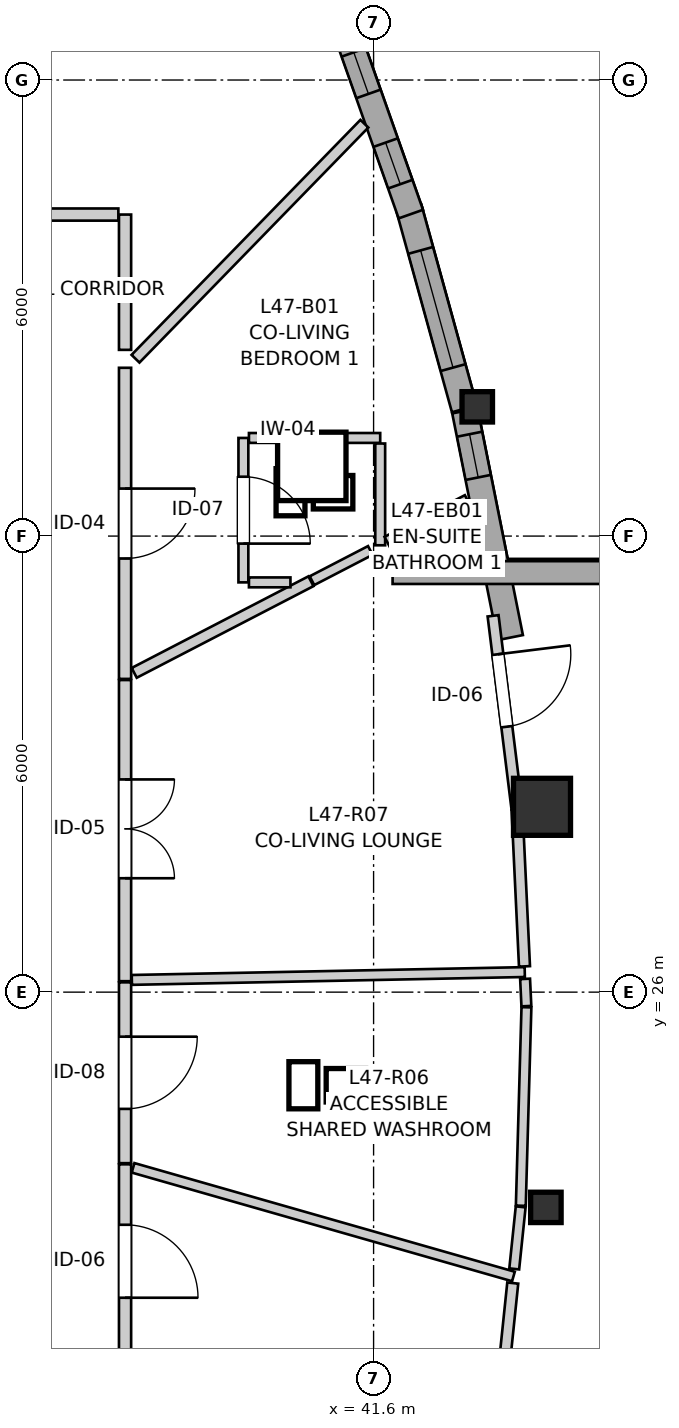
"""IFC4 building model, lengths in metres.
Left out: names, types, materials, properties, quantities, classifications, styles, units other than length and angle.
Written with IfcOpenShell. Run it as: python <this file> out.ifc"""

import sys

from ifc_helpers import new_model, si_unit, direction, frame, frame_2d, origin, origin_2d, place, context, subcontext, project, spatial, rectangle, i_section, extrude, source, transform, mapped, element, fill, save


model = new_model("IFC4")
c1 = context("Model", 3, precision=1e-05, world=origin(), true_north=direction((0.0, 1.0)))
c2 = subcontext(c1, "Body", "Model", "MODEL_VIEW")
j1 = project(units=[si_unit("LENGTHUNIT", "METRE"), si_unit("PLANEANGLEUNIT", "RADIAN")], contexts=[c1])
p1 = place(None, origin())
s1 = spatial("IfcSite", under=j1, at=p1, CompositionType="ELEMENT")
p2 = place(p1, origin())
s2 = spatial("IfcBuilding", under=s1, at=p2, CompositionType="ELEMENT")
p3 = place(p2, frame((0.0, 0.0, 158.6)))
s3 = spatial("IfcBuildingStorey", under=s2, at=p3, CompositionType="ELEMENT", Elevation=158.6)
m1 = source(origin(), c2, "Body", "SweptSolid", [
    extrude(i_section(OverallWidth=0.401, OverallDepth=0.399, WebThickness=0.023, FlangeThickness=0.036, FilletRadius=0.015, at=origin_2d()), origin(), (0.0, 0.0, 1.0), 2.95),
])
p4 = place(p3, frame((43.867, 23.168, 0.0), z_axis=(0.0, 0.0, 1.0), x_axis=(1.0, 0.0, 0.0)))
e1 = element("IfcColumn", 1, at=p4, inside=s3, PredefinedType="PILASTER", context=c2, shape_type="MappedRepresentation", body=[
    mapped(m1, transform((0.0, 0.0, 0.0), x_axis=(1.0, 0.0, 0.0), y_axis=(0.0, 1.0, 0.0), z_axis=(0.0, 0.0, 1.0), scale=1.0)),
])
m2 = source(origin(), c2, "Body", "SweptSolid", [
    extrude(rectangle(XDim=0.75, YDim=0.75, at=origin_2d()), origin(), (0.0, 0.0, 1.0), 2.95),
])
p5 = place(p3, frame((43.816, 28.438, 0.0), z_axis=(0.0, 0.0, 1.0), x_axis=(1.0, 0.0, 0.0)))
e2 = element("IfcColumn", 2, at=p5, inside=s3, PredefinedType="COLUMN", context=c2, shape_type="MappedRepresentation", body=[
    mapped(m2, transform((0.0, 0.0, 0.0), x_axis=(1.0, 0.0, 0.0), y_axis=(0.0, 1.0, 0.0), z_axis=(0.0, 0.0, 1.0), scale=1.0)),
])
p6 = place(p3, frame((42.964, 33.7, 0.0), z_axis=(0.0, 0.0, 1.0), x_axis=(1.0, 0.0, 0.0)))
e3 = element("IfcColumn", 3, at=p6, inside=s3, PredefinedType="PILASTER", context=c2, shape_type="MappedRepresentation", body=[
    mapped(m1, transform((0.0, 0.0, 0.0), x_axis=(1.0, 0.0, 0.0), y_axis=(0.0, 1.0, 0.0), z_axis=(0.0, 0.0, 1.0), scale=1.0)),
])
p7 = place(p3, frame((43.398, 30.664, 0.0), z_axis=(0.0, 0.0, 1.0), x_axis=(-0.196147002944, 0.980574501624, 0.0)))
e4 = element("IfcWall", 4, at=p7, inside=s3, PredefinedType="SOLIDWALL", context=c2, shape_type="SweptSolid", body=[
    extrude(rectangle(XDim=3.042, YDim=0.34, at=frame_2d((1.521, 0.0))), origin(), (0.0, 0.0, 1.0), 2.53),
])
p8 = place(p7, frame((2.149, 0.0, 0.82)))
e5 = element("IfcOpeningElement", 5, at=p8, cuts=e4, PredefinedType="OPENING", context=c2, shape_type="SweptSolid", body=[
    extrude(rectangle(XDim=0.58, YDim=1.35, at=frame_2d((0.29, 0.675))), frame((0.0, 0.18, 0.0), z_axis=(0.0, -1.0, 0.0), x_axis=(1.0, 0.0, 0.0)), (0.0, 0.0, 1.0), 0.36),
])
p9 = place(p3, frame((42.795, 33.674, 0.0), z_axis=(0.0, 0.0, 1.0), x_axis=(-0.266404970566, 0.963861188999, 0.0)))
e6 = element("IfcWall", 6, at=p9, inside=s3, PredefinedType="SOLIDWALL", context=c2, shape_type="SweptSolid", body=[
    extrude(rectangle(XDim=2.745, YDim=0.34, at=frame_2d((1.372, 0.0))), origin(), (0.0, 0.0, 1.0), 2.53),
])
p10 = place(p9, frame((0.562, 0.0, 0.82)))
e7 = element("IfcOpeningElement", 7, at=p10, cuts=e6, PredefinedType="OPENING", context=c2, shape_type="SweptSolid", body=[
    extrude(rectangle(XDim=1.6, YDim=1.35, at=frame_2d((0.8, 0.675))), frame((0.0, 0.18, 0.0), z_axis=(0.0, -1.0, 0.0), x_axis=(1.0, 0.0, 0.0)), (0.0, 0.0, 1.0), 0.36),
])
p11 = place(p3, frame((42.09, 36.236, 0.0), z_axis=(0.0, 0.0, 1.0), x_axis=(-0.332705243691, 0.943030869495, 0.0)))
e8 = element("IfcWall", 8, at=p11, inside=s3, PredefinedType="SOLIDWALL", context=c2, shape_type="SweptSolid", body=[
    extrude(rectangle(XDim=2.668, YDim=0.34, at=frame_2d((1.334, 0.0))), origin(), (0.0, 0.0, 1.0), 2.53),
])
p12 = place(p11, frame((0.417, 0.0, 0.82)))
e9 = element("IfcOpeningElement", 9, at=p12, cuts=e8, PredefinedType="OPENING", context=c2, shape_type="SweptSolid", body=[
    extrude(rectangle(XDim=0.58, YDim=1.35, at=frame_2d((0.29, 0.675))), frame((0.0, 0.18, 0.0), z_axis=(0.0, -1.0, 0.0), x_axis=(1.0, 0.0, 0.0)), (0.0, 0.0, 1.0), 0.36),
])
p13 = place(p11, frame((1.677, 0.0, 0.82)))
e10 = element("IfcOpeningElement", 10, at=p13, cuts=e8, PredefinedType="OPENING", context=c2, shape_type="SweptSolid", body=[
    extrude(rectangle(XDim=0.58, YDim=1.35, at=frame_2d((0.29, 0.675))), frame((0.0, 0.18, 0.0), z_axis=(0.0, -1.0, 0.0), x_axis=(1.0, 0.0, 0.0)), (0.0, 0.0, 1.0), 0.36),
])
p14 = place(p3, frame((41.85, 31.52, 0.0), z_axis=(0.0, 0.0, 1.0), x_axis=(1.0, 0.0, 0.0)))
e11 = element("IfcWall", 11, at=p14, inside=s3, PredefinedType="SOLIDWALL", context=c2, shape_type="SweptSolid", body=[
    extrude(rectangle(XDim=17.423, YDim=0.3, at=frame_2d((8.711, 0.0))), origin(), (0.0, 0.0, 1.0), 2.13),
])
p15 = place(p3, frame((38.33, 34.214, 0.0), z_axis=(0.0, 0.0, 1.0), x_axis=(0.0, -1.0, 0.0)))
e12 = element("IfcWall", 12, at=p15, inside=s3, PredefinedType="PARTITIONING", context=c2, shape_type="SweptSolid", body=[
    extrude(rectangle(XDim=4.093, YDim=0.16, at=frame_2d((2.046, 0.0))), origin(), (0.0, 0.0, 1.0), 2.95),
])
p16 = place(p15, frame((1.589, 0.0, 0.0)))
e13 = element("IfcOpeningElement", 13, at=p16, cuts=e12, PredefinedType="OPENING", context=c2, shape_type="SweptSolid", body=[
    extrude(rectangle(XDim=0.92, YDim=2.1, at=frame_2d((0.46, 1.05))), frame((0.0, 0.09, 0.0), z_axis=(0.0, -1.0, 0.0), x_axis=(1.0, 0.0, 0.0)), (0.0, 0.0, 1.0), 0.18),
])
p17 = place(p3, frame((38.33, 30.106, 0.0), z_axis=(0.0, 0.0, 1.0), x_axis=(0.0, -1.0, 0.0)))
e14 = element("IfcWall", 14, at=p17, inside=s3, PredefinedType="PARTITIONING", context=c2, shape_type="SweptSolid", body=[
    extrude(rectangle(XDim=3.962, YDim=0.16, at=frame_2d((1.981, 0.0))), origin(), (0.0, 0.0, 1.0), 2.95),
])
p18 = place(p17, frame((1.308, 0.0, 0.0)))
e15 = element("IfcOpeningElement", 15, at=p18, cuts=e14, PredefinedType="OPENING", context=c2, shape_type="SweptSolid", body=[
    extrude(rectangle(XDim=1.3, YDim=2.1, at=frame_2d((0.65, 1.05))), frame((0.0, 0.09, 0.0), z_axis=(0.0, -1.0, 0.0), x_axis=(1.0, 0.0, 0.0)), (0.0, 0.0, 1.0), 0.18),
])
p19 = place(p3, frame((43.172, 30.951, 0.0), z_axis=(0.0, 0.0, 1.0), x_axis=(0.122990311665, -0.99240787141, 0.0)))
e16 = element("IfcWall", 16, at=p19, inside=s3, PredefinedType="PARTITIONING", context=c2, shape_type="SweptSolid", body=[
    extrude(rectangle(XDim=2.561, YDim=0.145, at=frame_2d((1.28, 0.0))), origin(), (0.0, 0.0, 1.0), 2.518),
])
p20 = place(p19, frame((0.51, 0.0, 0.0)))
e17 = element("IfcOpeningElement", 17, at=p20, cuts=e16, PredefinedType="OPENING", context=c2, shape_type="SweptSolid", body=[
    extrude(rectangle(XDim=0.96, YDim=2.1, at=frame_2d((0.48, 1.05))), frame((0.0, 0.083, 0.0), z_axis=(0.0, -1.0, 0.0), x_axis=(1.0, 0.0, 0.0)), (0.0, 0.0, 1.0), 0.165),
])
p21 = place(p3, frame((38.33, 23.735, 0.0), z_axis=(0.0, 0.0, 1.0), x_axis=(0.0, -1.0, 0.0)))
e18 = element("IfcWall", 18, at=p21, inside=s3, PredefinedType="PARTITIONING", context=c2, shape_type="SweptSolid", body=[
    extrude(rectangle(XDim=2.535, YDim=0.16, at=frame_2d((1.268, 0.0))), origin(), (0.0, 0.0, 1.0), 2.95),
])
p22 = place(p21, frame((0.795, 0.0, 0.0)))
e19 = element("IfcOpeningElement", 19, at=p22, cuts=e18, PredefinedType="OPENING", context=c2, shape_type="SweptSolid", body=[
    extrude(rectangle(XDim=0.96, YDim=2.1, at=frame_2d((0.48, 1.05))), frame((0.0, 0.09, 0.0), z_axis=(0.0, -1.0, 0.0), x_axis=(1.0, 0.0, 0.0)), (0.0, 0.0, 1.0), 0.18),
])
p23 = place(p3, frame((38.33, 26.129, 0.0), z_axis=(0.0, 0.0, 1.0), x_axis=(0.0, -1.0, 0.0)))
e20 = element("IfcWall", 20, at=p23, inside=s3, PredefinedType="PARTITIONING", context=c2, shape_type="SweptSolid", body=[
    extrude(rectangle(XDim=2.379, YDim=0.16, at=frame_2d((1.189, 0.0))), origin(), (0.0, 0.0, 1.0), 2.95),
])
p24 = place(p23, frame((0.715, 0.0, 0.0)))
e21 = element("IfcOpeningElement", 21, at=p24, cuts=e20, PredefinedType="OPENING", context=c2, shape_type="SweptSolid", body=[
    extrude(rectangle(XDim=0.95, YDim=2.1, at=frame_2d((0.475, 1.05))), frame((0.0, 0.09, 0.0), z_axis=(0.0, -1.0, 0.0), x_axis=(1.0, 0.0, 0.0)), (0.0, 0.0, 1.0), 0.18),
])
p25 = place(p3, frame((39.887, 33.291, 0.0), z_axis=(0.0, 0.0, 1.0), x_axis=(0.0, -1.0, 0.0)))
e22 = element("IfcWall", 22, at=p25, inside=s3, PredefinedType="PARTITIONING", context=c2, shape_type="SweptSolid", body=[
    extrude(rectangle(XDim=1.9, YDim=0.13, at=frame_2d((0.95, 0.0))), origin(), (0.0, 0.0, 1.0), 2.95),
])
p26 = place(p25, frame((0.51, 0.0, 0.0)))
e23 = element("IfcOpeningElement", 23, at=p26, cuts=e22, PredefinedType="OPENING", context=c2, shape_type="SweptSolid", body=[
    extrude(rectangle(XDim=0.88, YDim=2.05, at=frame_2d((0.44, 1.025))), frame((0.0, 0.075, 0.0), z_axis=(0.0, -1.0, 0.0), x_axis=(1.0, 0.0, 0.0)), (0.0, 0.0, 1.0), 0.15),
])
p27 = place(p3, frame((38.436, 23.689, 0.0), z_axis=(0.0, 0.0, 1.0), x_axis=(0.961531027854, -0.274696345942, 0.0)))
e24 = element("IfcWall", 24, at=p27, inside=s3, PredefinedType="PARTITIONING", context=c2, shape_type="SweptSolid", body=[
    extrude(rectangle(XDim=5.205, YDim=0.13, at=frame_2d((2.602, 0.0))), origin(), (0.0, 0.0, 1.0), 2.95),
])
p28 = place(p3, frame((38.419, 26.161, 0.0), z_axis=(0.0, 0.0, 1.0), x_axis=(0.999801492135, 0.019924264719, 0.0)))
e25 = element("IfcWall", 25, at=p28, inside=s3, PredefinedType="PARTITIONING", context=c2, shape_type="SweptSolid", body=[
    extrude(rectangle(XDim=5.171, YDim=0.13, at=frame_2d((2.585, 0.0))), origin(), (0.0, 0.0, 1.0), 2.95),
])
p29 = place(p3, frame((38.468, 34.333, 0.0), z_axis=(0.0, 0.0, 1.0), x_axis=(0.697683159601, 0.71640645503, 0.0)))
e26 = element("IfcWall", 26, at=p29, inside=s3, PredefinedType="PARTITIONING", context=c2, shape_type="SweptSolid", body=[
    extrude(rectangle(XDim=4.316, YDim=0.145, at=frame_2d((2.158, 0.0))), origin(), (0.0, 0.0, 1.0), 2.95),
])
p30 = place(p3, frame((38.45, 30.2, 0.0), z_axis=(0.0, 0.0, 1.0), x_axis=(0.887788385545, 0.460251868537, 0.0)))
e27 = element("IfcWall", 27, at=p30, inside=s3, PredefinedType="PARTITIONING", context=c2, shape_type="SweptSolid", body=[
    extrude(rectangle(XDim=2.619, YDim=0.145, at=frame_2d((1.31, 0.0))), origin(), (0.0, 0.0, 1.0), 2.95),
])
p31 = place(p3, frame((43.537, 23.19, 0.0), z_axis=(0.0, 0.0, 1.0), x_axis=(0.028319632762, 0.999598918767, 0.0)))
e28 = element("IfcWall", 28, at=p31, inside=s3, PredefinedType="PARTITIONING", context=c2, shape_type="SweptSolid", body=[
    extrude(rectangle(XDim=2.612, YDim=0.13, at=frame_2d((1.306, 0.0))), origin(), (0.0, 0.0, 1.0), 2.518),
])
p32 = place(p3, frame((43.488, 28.395, 0.0), z_axis=(0.0, 0.0, 1.0), x_axis=(0.047441179451, -0.998874033346, 0.0)))
e29 = element("IfcWall", 29, at=p32, inside=s3, PredefinedType="PARTITIONING", context=c2, shape_type="SweptSolid", body=[
    extrude(rectangle(XDim=2.058, YDim=0.145, at=frame_2d((1.029, 0.0))), origin(), (0.0, 0.0, 1.0), 2.518),
])
p33 = place(p3, frame((39.96, 33.291, 0.0), z_axis=(0.0, 0.0, 1.0), x_axis=(1.0, 0.0, 0.0)))
e30 = element("IfcWall", 30, at=p33, inside=s3, PredefinedType="PARTITIONING", context=c2, shape_type="SweptSolid", body=[
    extrude(rectangle(XDim=1.727, YDim=0.13, at=frame_2d((0.864, 0.0))), origin(), (0.0, 0.0, 1.0), 2.95),
])
p34 = place(p3, frame((38.33, 34.45, 0.0), z_axis=(0.0, 0.0, 1.0), x_axis=(0.0, 1.0, 0.0)))
e31 = element("IfcWall", 31, at=p34, inside=s3, PredefinedType="PARTITIONING", context=c2, shape_type="SweptSolid", body=[
    extrude(rectangle(XDim=1.78, YDim=0.16, at=frame_2d((0.89, 0.0))), origin(), (0.0, 0.0, 1.0), 2.95),
])
p35 = place(p3, frame((36.565, 36.23, 0.0), z_axis=(0.0, 0.0, 1.0), x_axis=(1.0, 0.0, 0.0)))
e32 = element("IfcWall", 32, at=p35, inside=s3, PredefinedType="PARTITIONING", context=c2, shape_type="SweptSolid", body=[
    extrude(rectangle(XDim=1.677, YDim=0.16, at=frame_2d((0.838, 0.0))), origin(), (0.0, 0.0, 1.0), 2.95),
])
p36 = place(p3, frame((43.273, 20.646, 0.0), z_axis=(0.0, 0.0, 1.0), x_axis=(0.103045636414, 0.99467662927, 0.0)))
e33 = element("IfcWall", 33, at=p36, inside=s3, PredefinedType="PARTITIONING", context=c2, shape_type="SweptSolid", body=[
    extrude(rectangle(XDim=1.535, YDim=0.145, at=frame_2d((0.768, 0.0))), origin(), (0.0, 0.0, 1.0), 2.518),
])
p37 = place(p3, frame((41.687, 31.879, 0.0), z_axis=(0.0, 0.0, 1.0), x_axis=(0.0, 1.0, 0.0)))
e34 = element("IfcWall", 34, at=p37, inside=s3, PredefinedType="PARTITIONING", context=c2, shape_type="SweptSolid", body=[
    extrude(rectangle(XDim=1.339, YDim=0.13, at=frame_2d((0.669, 0.0))), origin(), (0.0, 0.0, 1.0), 2.95),
])
p38 = place(p3, frame((41.778, 31.926, 0.0), z_axis=(0.0, 0.0, 1.0), x_axis=(0.887683122967, 0.460454854681, 0.0)))
e35 = element("IfcWall", 35, at=p38, inside=s3, PredefinedType="PARTITIONING", context=c2, shape_type="SweptSolid", body=[
    extrude(rectangle(XDim=1.19, YDim=0.145, at=frame_2d((0.595, 0.0))), origin(), (0.0, 0.0, 1.0), 2.95),
])
p39 = place(p3, frame((40.789, 31.413, 0.0), z_axis=(0.0, 0.0, 1.0), x_axis=(0.887895541879, 0.460045113779, 0.0)))
e36 = element("IfcWall", 36, at=p39, inside=s3, PredefinedType="PARTITIONING", context=c2, shape_type="SweptSolid", body=[
    extrude(rectangle(XDim=0.865, YDim=0.13, at=frame_2d((0.432, 0.0))), origin(), (0.0, 0.0, 1.0), 2.95),
])
p40 = place(p3, frame((43.45, 22.359, 0.0), z_axis=(0.0, 0.0, 1.0), x_axis=(0.103538633142, 0.994625432737, 0.0)))
e37 = element("IfcWall", 37, at=p40, inside=s3, PredefinedType="PARTITIONING", context=c2, shape_type="SweptSolid", body=[
    extrude(rectangle(XDim=0.821, YDim=0.13, at=frame_2d((0.41, 0.0))), origin(), (0.0, 0.0, 1.0), 2.518),
])
p41 = place(p3, frame((39.96, 31.391, 0.0), z_axis=(0.0, 0.0, 1.0), x_axis=(1.0, 0.0, 0.0)))
e38 = element("IfcWall", 38, at=p41, inside=s3, PredefinedType="PARTITIONING", context=c2, shape_type="SweptSolid", body=[
    extrude(rectangle(XDim=0.546, YDim=0.13, at=frame_2d((0.273, 0.0))), origin(), (0.0, 0.0, 1.0), 2.118),
])
p42 = place(p3, frame((43.593, 26.174, 0.0), z_axis=(0.0, 0.0, 1.0), x_axis=(0.04762980516, -0.998865056782, 0.0)))
e39 = element("IfcWall", 39, at=p42, inside=s3, PredefinedType="PARTITIONING", context=c2, shape_type="SweptSolid", body=[
    extrude(rectangle(XDim=0.359, YDim=0.13, at=frame_2d((0.179, 0.0))), origin(), (0.0, 0.0, 1.0), 2.518),
])
m3 = source(origin(), c2, "Body", "SweptSolid", [
    extrude(rectangle(XDim=0.58, YDim=1.35, at=frame_2d((0.29, 0.675))), frame((0.0, 0.03, 0.0), z_axis=(0.0, -1.0, 0.0), x_axis=(1.0, 0.0, 0.0)), (0.0, 0.0, 1.0), 0.06),
])
p43 = place(p8, origin())
e40 = element("IfcWindow", 40, at=p43, inside=s3, PartitioningType="SINGLE_PANEL", PredefinedType="WINDOW", context=c2, shape_type="MappedRepresentation", body=[
    mapped(m3, transform((0.0, 0.0, 0.0), x_axis=(1.0, 0.0, 0.0), y_axis=(0.0, 1.0, 0.0), z_axis=(0.0, 0.0, 1.0), scale=1.0)),
])
fill(e5, e40)
m4 = source(origin(), c2, "Body", "SweptSolid", [
    extrude(rectangle(XDim=1.6, YDim=1.35, at=frame_2d((0.8, 0.675))), frame((0.0, 0.03, 0.0), z_axis=(0.0, -1.0, 0.0), x_axis=(1.0, 0.0, 0.0)), (0.0, 0.0, 1.0), 0.06),
])
p44 = place(p10, origin())
e41 = element("IfcWindow", 41, at=p44, inside=s3, PartitioningType="SINGLE_PANEL", PredefinedType="WINDOW", context=c2, shape_type="MappedRepresentation", body=[
    mapped(m4, transform((0.0, 0.0, 0.0), x_axis=(1.0, 0.0, 0.0), y_axis=(0.0, 1.0, 0.0), z_axis=(0.0, 0.0, 1.0), scale=1.0)),
])
fill(e7, e41)
p45 = place(p12, origin())
e42 = element("IfcWindow", 42, at=p45, inside=s3, PartitioningType="SINGLE_PANEL", PredefinedType="WINDOW", context=c2, shape_type="MappedRepresentation", body=[
    mapped(m3, transform((0.0, 0.0, 0.0), x_axis=(1.0, 0.0, 0.0), y_axis=(0.0, 1.0, 0.0), z_axis=(0.0, 0.0, 1.0), scale=1.0)),
])
fill(e9, e42)
p46 = place(p13, origin())
e43 = element("IfcWindow", 43, at=p46, inside=s3, PartitioningType="SINGLE_PANEL", PredefinedType="WINDOW", context=c2, shape_type="MappedRepresentation", body=[
    mapped(m3, transform((0.0, 0.0, 0.0), x_axis=(1.0, 0.0, 0.0), y_axis=(0.0, 1.0, 0.0), z_axis=(0.0, 0.0, 1.0), scale=1.0)),
])
fill(e10, e43)
m5 = source(origin(), c2, "Body", "SweptSolid", [
    extrude(rectangle(XDim=0.92, YDim=2.1, at=frame_2d((0.46, 1.05))), frame((0.0, 0.025, 0.0), z_axis=(0.0, -1.0, 0.0), x_axis=(1.0, 0.0, 0.0)), (0.0, 0.0, 1.0), 0.05),
])
p47 = place(p16, origin())
e44 = element("IfcDoor", 44, at=p47, inside=s3, OperationType="SINGLE_SWING_LEFT", PredefinedType="DOOR", context=c2, shape_type="MappedRepresentation", body=[
    mapped(m5, transform((0.0, 0.0, 0.0), x_axis=(1.0, 0.0, 0.0), y_axis=(0.0, 1.0, 0.0), z_axis=(0.0, 0.0, 1.0), scale=1.0)),
])
fill(e13, e44)
m6 = source(origin(), c2, "Body", "SweptSolid", [
    extrude(rectangle(XDim=1.3, YDim=2.1, at=frame_2d((0.65, 1.05))), frame((0.0, 0.025, 0.0), z_axis=(0.0, -1.0, 0.0), x_axis=(1.0, 0.0, 0.0)), (0.0, 0.0, 1.0), 0.05),
])
p48 = place(p18, origin())
e45 = element("IfcDoor", 45, at=p48, inside=s3, OperationType="DOUBLE_DOOR_SINGLE_SWING", PredefinedType="DOOR", context=c2, shape_type="MappedRepresentation", body=[
    mapped(m6, transform((0.0, 0.0, 0.0), x_axis=(1.0, 0.0, 0.0), y_axis=(0.0, 1.0, 0.0), z_axis=(0.0, 0.0, 1.0), scale=1.0)),
])
fill(e15, e45)
m7 = source(origin(), c2, "Body", "SweptSolid", [
    extrude(rectangle(XDim=0.96, YDim=2.1, at=frame_2d((0.48, 1.05))), frame((0.0, 0.025, 0.0), z_axis=(0.0, -1.0, 0.0), x_axis=(1.0, 0.0, 0.0)), (0.0, 0.0, 1.0), 0.05),
])
p49 = place(p20, origin())
e46 = element("IfcDoor", 46, at=p49, inside=s3, OperationType="SINGLE_SWING_LEFT", PredefinedType="DOOR", context=c2, shape_type="MappedRepresentation", body=[
    mapped(m7, transform((0.0, 0.0, 0.0), x_axis=(1.0, 0.0, 0.0), y_axis=(0.0, 1.0, 0.0), z_axis=(0.0, 0.0, 1.0), scale=1.0)),
])
fill(e17, e46)
p50 = place(p22, origin())
e47 = element("IfcDoor", 47, at=p50, inside=s3, OperationType="SINGLE_SWING_RIGHT", PredefinedType="DOOR", context=c2, shape_type="MappedRepresentation", body=[
    mapped(m7, transform((0.0, 0.0, 0.0), x_axis=(1.0, 0.0, 0.0), y_axis=(0.0, 1.0, 0.0), z_axis=(0.0, 0.0, 1.0), scale=1.0)),
])
fill(e19, e47)
m8 = source(origin(), c2, "Body", "SweptSolid", [
    extrude(rectangle(XDim=0.95, YDim=2.1, at=frame_2d((0.475, 1.05))), frame((0.0, 0.025, 0.0), z_axis=(0.0, -1.0, 0.0), x_axis=(1.0, 0.0, 0.0)), (0.0, 0.0, 1.0), 0.05),
])
p51 = place(p24, origin())
e48 = element("IfcDoor", 48, at=p51, inside=s3, OperationType="SINGLE_SWING_LEFT", PredefinedType="DOOR", context=c2, shape_type="MappedRepresentation", body=[
    mapped(m8, transform((0.0, 0.0, 0.0), x_axis=(1.0, 0.0, 0.0), y_axis=(0.0, 1.0, 0.0), z_axis=(0.0, 0.0, 1.0), scale=1.0)),
])
fill(e21, e48)
m9 = source(origin(), c2, "Body", "SweptSolid", [
    extrude(rectangle(XDim=0.88, YDim=2.05, at=frame_2d((0.44, 1.025))), frame((0.0, 0.025, 0.0), z_axis=(0.0, -1.0, 0.0), x_axis=(1.0, 0.0, 0.0)), (0.0, 0.0, 1.0), 0.05),
])
p52 = place(p26, origin())
e49 = element("IfcDoor", 49, at=p52, inside=s3, OperationType="SINGLE_SWING_RIGHT", PredefinedType="DOOR", context=c2, shape_type="MappedRepresentation", body=[
    mapped(m9, transform((0.0, 0.0, 0.0), x_axis=(1.0, 0.0, 0.0), y_axis=(0.0, 1.0, 0.0), z_axis=(0.0, 0.0, 1.0), scale=1.0)),
])
fill(e23, e49)
save(model, sys.argv[1])
